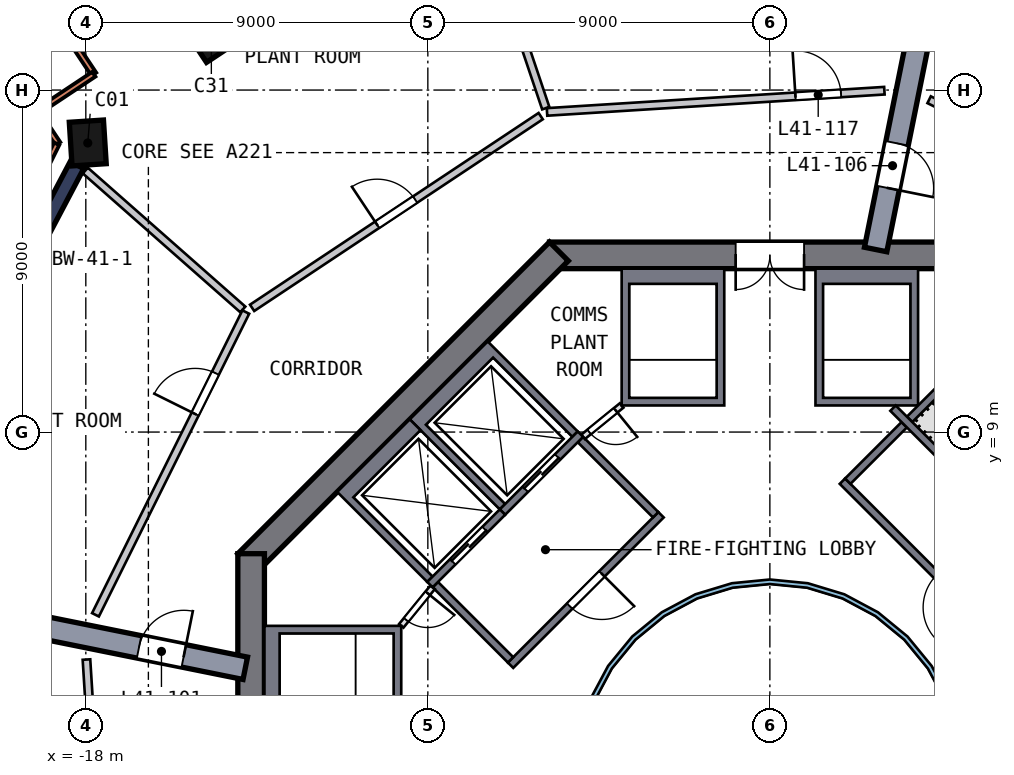
"""IFC4 building model, lengths in metres.
Left out: names, types, materials, properties, quantities, classifications, styles, units other than length and angle.
Written with IfcOpenShell. Run it as: python <this file> out.ifc"""

import sys

from ifc_helpers import new_model, si_unit, direction, frame, frame_2d, origin, origin_2d, place, context, subcontext, project, spatial, polyline, rectangle, outline, extrude, element, fill, save


model = new_model("IFC4")
c1 = context("Model", 3, precision=1e-05, world=origin(), true_north=direction((0.0, 1.0)))
c2 = subcontext(c1, "Body", "Model", "MODEL_VIEW")
j1 = project(units=[si_unit("LENGTHUNIT", "METRE"), si_unit("PLANEANGLEUNIT", "RADIAN")], contexts=[c1])
p1 = place(None, origin())
s1 = spatial("IfcSite", under=j1, at=p1, CompositionType="ELEMENT")
p2 = place(p1, origin())
s2 = spatial("IfcBuilding", under=s1, at=p2, CompositionType="ELEMENT")
p3 = place(p2, frame((0.0, 0.0, 169.0)))
s3 = spatial("IfcBuildingStorey", under=s2, at=p3, CompositionType="ELEMENT", Elevation=169.0)
p4 = place(p3, frame((-17.893, 16.668, 0.0), z_axis=(-0.046008343, -0.050230285, 0.997677378), x_axis=(-0.065051688, 0.99676572, 0.047184497)))
e1 = element("IfcColumn", 1, at=p4, inside=s3, PredefinedType="COLUMN", context=c2, shape_type="SweptSolid", body=[
    extrude(rectangle(XDim=1.15, YDim=0.9, at=origin_2d()), origin(), (0.0, 0.0, 1.0), 4.51),
])
p5 = place(p3, frame((-14.632, 19.403, 0.0), z_axis=(-0.053750027, -0.041192116, 0.997704437), x_axis=(-0.553129571, 0.83308256, 0.004596255)))
e2 = element("IfcColumn", 2, at=p5, inside=s3, PredefinedType="COLUMN", context=c2, shape_type="SweptSolid", body=[
    extrude(rectangle(XDim=0.9, YDim=0.9, at=origin_2d()), origin(), (0.0, 0.0, 1.0), 4.51),
])
p6 = place(p3, frame((5.799, 13.65, 0.0), z_axis=(0.0, 0.0, 1.0), x_axis=(-1.0, 0.0, 0.0)))
e3 = element("IfcWall", 3, at=p6, inside=s3, PredefinedType="SHEAR", context=c2, shape_type="SweptSolid", body=[
    extrude(rectangle(XDim=11.598, YDim=0.7, at=frame_2d((5.799, 0.0))), origin(), (0.0, 0.0, 1.0), 6.0),
])
p7 = place(p6, frame((4.899, 0.0, 0.0)))
e4 = element("IfcOpeningElement", 4, at=p7, cuts=e3, PredefinedType="OPENING", context=c2, shape_type="SweptSolid", body=[
    extrude(rectangle(XDim=1.8, YDim=2.1, at=frame_2d((0.9, 1.05))), frame((0.0, 0.36, 0.0), z_axis=(0.0, -1.0, 0.0), x_axis=(1.0, 0.0, 0.0)), (0.0, 0.0, 1.0), 0.72),
])
p8 = place(p3, frame((-5.552, 13.752, 0.0), z_axis=(0.0, 0.0, 1.0), x_axis=(-0.707106781, -0.707106781, 0.0)))
e5 = element("IfcWall", 5, at=p8, inside=s3, PredefinedType="SHEAR", context=c2, shape_type="SweptSolid", body=[
    extrude(rectangle(XDim=11.598, YDim=0.7, at=frame_2d((5.799, 0.0))), origin(), (0.0, 0.0, 1.0), 6.0),
])
p9 = place(p3, frame((-13.65, 5.799, 0.0), z_axis=(0.0, 0.0, 1.0), x_axis=(0.0, -1.0, 0.0)))
e6 = element("IfcWall", 6, at=p9, inside=s3, PredefinedType="SHEAR", context=c2, shape_type="SweptSolid", body=[
    extrude(rectangle(XDim=11.598, YDim=0.7, at=frame_2d((5.799, 0.0))), origin(), (0.0, 0.0, 1.0), 6.0),
])
p10 = place(p9, frame((4.899, 0.0, 0.0)))
e7 = element("IfcOpeningElement", 7, at=p10, cuts=e6, PredefinedType="OPENING", context=c2, shape_type="SweptSolid", body=[
    extrude(rectangle(XDim=1.8, YDim=2.1, at=frame_2d((0.9, 1.05))), frame((0.0, 0.36, 0.0), z_axis=(0.0, -1.0, 0.0), x_axis=(1.0, 0.0, 0.0)), (0.0, 0.0, 1.0), 0.72),
])
p11 = place(p3, frame((-18.232, 16.026, 0.0), z_axis=(0.0, 0.0, 1.0), x_axis=(-0.466316568, -0.884617917, 0.0)))
e8 = element("IfcWall", 8, at=p11, inside=s3, PredefinedType="SHEAR", context=c2, shape_type="SweptSolid", body=[
    extrude(rectangle(XDim=5.664, YDim=0.4, at=frame_2d((2.832, 0.0))), origin(), (0.0, 0.0, 1.0), 4.5),
])
p12 = place(p3, frame((-13.804, 2.783, 0.0), z_axis=(0.0, 0.0, 1.0), x_axis=(-0.980274297, 0.197641857, 0.0)))
e9 = element("IfcWall", 9, at=p12, inside=s3, PredefinedType="SHEAR", context=c2, shape_type="SweptSolid", body=[
    extrude(rectangle(XDim=9.661, YDim=0.6, at=frame_2d((4.831, 0.0))), origin(), (0.0, 0.0, 1.0), 4.5),
])
p13 = place(p12, frame((1.65, 0.0, 0.0)))
e10 = element("IfcOpeningElement", 10, at=p13, cuts=e9, PredefinedType="OPENING", context=c2, shape_type="SweptSolid", body=[
    extrude(rectangle(XDim=1.2, YDim=2.1, at=frame_2d((0.6, 1.05))), frame((0.0, 0.31, 0.0), z_axis=(0.0, -1.0, 0.0), x_axis=(1.0, 0.0, 0.0)), (0.0, 0.0, 1.0), 0.62),
])
p14 = place(p3, frame((2.783, 13.804, 0.0), z_axis=(0.0, 0.0, 1.0), x_axis=(0.197641857, 0.980274297, 0.0)))
e11 = element("IfcWall", 11, at=p14, inside=s3, PredefinedType="SHEAR", context=c2, shape_type="SweptSolid", body=[
    extrude(rectangle(XDim=9.661, YDim=0.6, at=frame_2d((4.831, 0.0))), origin(), (0.0, 0.0, 1.0), 4.5),
])
p15 = place(p14, frame((1.65, 0.0, 0.0)))
e12 = element("IfcOpeningElement", 12, at=p15, cuts=e11, PredefinedType="OPENING", context=c2, shape_type="SweptSolid", body=[
    extrude(rectangle(XDim=1.2, YDim=2.1, at=frame_2d((0.6, 1.05))), frame((0.0, 0.31, 0.0), z_axis=(0.0, -1.0, 0.0), x_axis=(1.0, 0.0, 0.0)), (0.0, 0.0, 1.0), 0.62),
])
p16 = place(p3, frame((-18.826, 19.978, 0.0), z_axis=(0.0, 0.0, 1.0), x_axis=(0.5533774, -0.832930641, 0.0)))
e13 = element("IfcWall", 13, at=p16, inside=s3, PredefinedType="SOLIDWALL", context=c2, shape_type="SweptSolid", body=[
    extrude(rectangle(XDim=1.875, YDim=0.15, at=frame_2d((0.938, 0.0))), origin(), (0.0, 0.0, 1.0), 4.5),
])
p17 = place(p3, frame((-17.789, 18.416, 0.0), z_axis=(0.0, 0.0, 1.0), x_axis=(-0.832925657, -0.553384902, 0.0)))
e14 = element("IfcWall", 14, at=p17, inside=s3, PredefinedType="SOLIDWALL", context=c2, shape_type="SweptSolid", body=[
    extrude(rectangle(XDim=1.8, YDim=0.15, at=frame_2d((0.9, 0.0))), origin(), (0.0, 0.0, 1.0), 4.5),
])
p18 = place(p3, frame((-19.329, 17.483, 0.0), z_axis=(0.0, 0.0, 1.0), x_axis=(0.553389442, -0.83292264, 0.0)))
e15 = element("IfcWall", 15, at=p18, inside=s3, PredefinedType="SOLIDWALL", context=c2, shape_type="SweptSolid", body=[
    extrude(rectangle(XDim=1.075, YDim=0.15, at=frame_2d((0.538, 0.0))), origin(), (0.0, 0.0, 1.0), 4.5),
])
p19 = place(p3, frame((-18.766, 16.585, 0.0), z_axis=(0.0, 0.0, 1.0), x_axis=(-0.444629289, -0.895714684, 0.0)))
e16 = element("IfcWall", 16, at=p19, inside=s3, PredefinedType="SOLIDWALL", context=c2, shape_type="SweptSolid", body=[
    extrude(rectangle(XDim=13.046, YDim=0.15, at=frame_2d((6.523, 0.0))), origin(), (0.0, 0.0, 1.0), 4.5),
])
p20 = place(p3, origin())
e17 = element("IfcWall", 17, at=p20, inside=s3, PredefinedType="SOLIDWALL", context=c2, shape_type="SweptSolid", body=[
    extrude(outline(polyline([(1.2, 13.3), (3.9, 13.3), (3.9, 9.7), (1.2, 9.7), (1.2, 13.3)]), holes=[polyline([(3.7, 9.9), (3.7, 12.9), (1.4, 12.9), (1.4, 9.9), (3.7, 9.9)])]), origin(), (0.0, 0.0, 1.0), 5.55),
])
p21 = place(p3, origin())
e18 = element("IfcWall", 18, at=p21, inside=s3, PredefinedType="SOLIDWALL", context=c2, shape_type="SweptSolid", body=[
    extrude(outline(polyline([(-3.9, 9.7), (-3.9, 13.3), (-1.2, 13.3), (-1.2, 9.7), (-3.9, 9.7)]), holes=[polyline([(-1.4, 12.9), (-3.7, 12.9), (-3.7, 9.9), (-1.4, 9.9), (-1.4, 12.9)])]), origin(), (0.0, 0.0, 1.0), 5.55),
])
p22 = place(p3, origin())
e19 = element("IfcWall", 19, at=p22, inside=s3, PredefinedType="SOLIDWALL", context=c2, shape_type="SweptSolid", body=[
    extrude(outline(polyline([(-13.3, 1.2), (-13.3, 3.9), (-9.7, 3.9), (-9.7, 1.2), (-13.3, 1.2)]), holes=[polyline([(-9.9, 3.7), (-12.9, 3.7), (-12.9, 1.4), (-9.9, 1.4), (-9.9, 3.7)])]), origin(), (0.0, 0.0, 1.0), 5.55),
])
p23 = place(p3, origin())
e20 = element("IfcWall", 20, at=p23, inside=s3, PredefinedType="SOLIDWALL", context=c2, shape_type="SweptSolid", body=[
    extrude(outline(polyline([(-9.475, 9.334), (-7.425, 11.385), (-5.056, 9.016), (-5.197, 8.874), (-7.283, 10.96), (-9.051, 9.192), (-6.965, 7.106), (-7.106, 6.965), (-9.475, 9.334)])), origin(), (0.0, 0.0, 1.0), 5.55),
])
p24 = place(p3, frame((-4.985, 8.945, 0.0), z_axis=(0.0, 0.0, 1.0), x_axis=(-0.707106781, -0.707106781, 0.0)))
e21 = element("IfcWall", 21, at=p24, inside=s3, PredefinedType="SOLIDWALL", context=c2, shape_type="SweptSolid", body=[
    extrude(rectangle(XDim=2.9, YDim=0.2, at=frame_2d((1.45, 0.0))), origin(), (0.0, 0.0, 1.0), 5.55),
])
p25 = place(p24, frame((0.85, 0.0, 0.0)))
e22 = element("IfcOpeningElement", 22, at=p25, cuts=e21, PredefinedType="OPENING", context=c2, shape_type="SweptSolid", body=[
    extrude(rectangle(XDim=1.2, YDim=2.1, at=frame_2d((0.6, 1.05))), frame((0.0, 0.11, 0.0), z_axis=(0.0, -1.0, 0.0), x_axis=(1.0, 0.0, 0.0)), (0.0, 0.0, 1.0), 0.22),
])
p26 = place(p3, origin())
e23 = element("IfcWall", 23, at=p26, inside=s3, PredefinedType="SOLIDWALL", context=c2, shape_type="SweptSolid", body=[
    extrude(outline(polyline([(-11.385, 7.425), (-9.475, 9.334), (-9.192, 9.051), (-10.96, 7.283), (-8.874, 5.197), (-9.016, 5.056), (-11.385, 7.425)])), origin(), (0.0, 0.0, 1.0), 5.55),
])
p27 = place(p3, frame((-7.036, 6.894, 0.0), z_axis=(0.0, 0.0, 1.0), x_axis=(-0.707106781, -0.707106781, 0.0)))
e24 = element("IfcWall", 24, at=p27, inside=s3, PredefinedType="SOLIDWALL", context=c2, shape_type="SweptSolid", body=[
    extrude(rectangle(XDim=2.7, YDim=0.2, at=frame_2d((1.35, 0.0))), origin(), (0.0, 0.0, 1.0), 5.55),
])
p28 = place(p27, frame((0.65, 0.0, 0.0)))
e25 = element("IfcOpeningElement", 25, at=p28, cuts=e24, PredefinedType="OPENING", context=c2, shape_type="SweptSolid", body=[
    extrude(rectangle(XDim=1.2, YDim=2.1, at=frame_2d((0.6, 1.05))), frame((0.0, 0.11, 0.0), z_axis=(0.0, -1.0, 0.0), x_axis=(1.0, 0.0, 0.0)), (0.0, 0.0, 1.0), 0.22),
])
p29 = place(p3, frame((3.24, 9.629, 0.0), z_axis=(0.0, 0.0, 1.0), x_axis=(0.707106781, -0.707106781, 0.0)))
e26 = element("IfcWall", 26, at=p29, inside=s3, PredefinedType="SOLIDWALL", context=c2, shape_type="SweptSolid", body=[
    extrude(rectangle(XDim=9.036, YDim=0.2, at=frame_2d((4.518, 0.0))), origin(), (0.0, 0.0, 1.0), 5.55),
])
p30 = place(p29, frame((7.018, 0.0, 0.0)))
e27 = element("IfcOpeningElement", 27, at=p30, cuts=e26, PredefinedType="OPENING", context=c2, shape_type="SweptSolid", body=[
    extrude(rectangle(XDim=1.2, YDim=2.1, at=frame_2d((0.6, 1.05))), frame((0.0, 0.11, 0.0), z_axis=(0.0, -1.0, 0.0), x_axis=(1.0, 0.0, 0.0)), (0.0, 0.0, 1.0), 0.22),
])
p31 = place(p3, frame((3.677, 9.334, 0.0), z_axis=(0.0, 0.0, 1.0), x_axis=(0.707106781, 0.707106781, 0.0)))
e28 = element("IfcWall", 28, at=p31, inside=s3, PredefinedType="SOLIDWALL", context=c2, shape_type="SweptSolid", body=[
    extrude(rectangle(XDim=4.1, YDim=0.2, at=frame_2d((2.05, 0.0))), origin(), (0.0, 0.0, 1.0), 5.55),
])
p32 = place(p3, frame((-2.864, 6.823, 0.0), z_axis=(0.0, 0.0, 1.0), x_axis=(-0.707106781, -0.707106781, 0.0)))
e29 = element("IfcWall", 29, at=p32, inside=s3, PredefinedType="SOLIDWALL", context=c2, shape_type="SweptSolid", body=[
    extrude(rectangle(XDim=5.6, YDim=0.2, at=frame_2d((2.8, 0.0))), origin(), (0.0, 0.0, 1.0), 5.55),
])
p33 = place(p32, frame((2.2, 0.0, 0.0)))
e30 = element("IfcOpeningElement", 30, at=p33, cuts=e29, PredefinedType="OPENING", context=c2, shape_type="SweptSolid", body=[
    extrude(rectangle(XDim=1.2, YDim=2.1, at=frame_2d((0.6, 1.05))), frame((0.0, 0.11, 0.0), z_axis=(0.0, -1.0, 0.0), x_axis=(1.0, 0.0, 0.0)), (0.0, 0.0, 1.0), 0.22),
])
for number, where, z_axis, x_axis in (
    (31, (-3.005, 6.823, 0.0), (0.0, 0.0, 1.0), (-0.707, 0.707, 0.0)),
    (32, (-6.823, 3.005, 0.0), (0.0, 0.0, 1.0), (-0.707, 0.707, 0.0)),
):
    element("IfcWall", number, at=place(p3, frame(where, z_axis=z_axis, x_axis=x_axis)), inside=s3, PredefinedType="SOLIDWALL", context=c2, shape_type="SweptSolid", body=[
        extrude(rectangle(XDim=2.8, YDim=0.2, at=frame_2d((1.4, 0.0))), origin(), (0.0, 0.0, 1.0), 5.55),
    ])
p34 = place(p3, frame((-3.9, 9.7, 0.0), z_axis=(0.0, 0.0, 1.0), x_axis=(-0.775559878, -0.631274009, 0.0)))
e33 = element("IfcWall", 33, at=p34, inside=s3, PredefinedType="PARTITIONING", context=c2, shape_type="SweptSolid", body=[
    extrude(rectangle(XDim=1.308, YDim=0.15, at=frame_2d((0.654, 0.0))), origin(), (0.0, 0.0, 1.0), 5.55),
])
p35 = place(p34, frame((0.204, 0.0, 0.0)))
e34 = element("IfcOpeningElement", 34, at=p35, cuts=e33, PredefinedType="OPENING", context=c2, shape_type="SweptSolid", body=[
    extrude(rectangle(XDim=0.9, YDim=2.1, at=frame_2d((0.45, 1.05))), frame((0.0, 0.085, 0.0), z_axis=(0.0, -1.0, 0.0), x_axis=(1.0, 0.0, 0.0)), (0.0, 0.0, 1.0), 0.17),
])
p36 = place(p3, frame((-8.874, 4.914, 0.0), z_axis=(0.0, 0.0, 1.0), x_axis=(-0.631274009, -0.775559878, 0.0)))
e35 = element("IfcWall", 35, at=p36, inside=s3, PredefinedType="PARTITIONING", context=c2, shape_type="SweptSolid", body=[
    extrude(rectangle(XDim=1.308, YDim=0.15, at=frame_2d((0.654, 0.0))), origin(), (0.0, 0.0, 1.0), 5.55),
])
p37 = place(p36, frame((0.204, 0.0, 0.0)))
e36 = element("IfcOpeningElement", 36, at=p37, cuts=e35, PredefinedType="OPENING", context=c2, shape_type="SweptSolid", body=[
    extrude(rectangle(XDim=0.9, YDim=2.1, at=frame_2d((0.45, 1.05))), frame((0.0, 0.085, 0.0), z_axis=(0.0, -1.0, 0.0), x_axis=(1.0, 0.0, 0.0)), (0.0, 0.0, 1.0), 0.17),
])
p38 = place(p3, frame((7.708, 1.909, 0.0), z_axis=(0.0, 0.0, 1.0), x_axis=(-0.707106781, 0.707106781, 0.0)))
e37 = element("IfcWall", 37, at=p38, inside=s3, PredefinedType="SOLIDWALL", context=c2, shape_type="SweptSolid", body=[
    extrude(rectangle(XDim=8.2, YDim=0.2, at=frame_2d((4.1, 0.0))), origin(), (0.0, 0.0, 1.0), 5.55),
])
p39 = place(p38, frame((3.5, 0.0, 0.0)))
e38 = element("IfcOpeningElement", 38, at=p39, cuts=e37, PredefinedType="OPENING", context=c2, shape_type="SweptSolid", body=[
    extrude(rectangle(XDim=1.2, YDim=2.1, at=frame_2d((0.6, 1.05))), frame((0.0, 0.11, 0.0), z_axis=(0.0, -1.0, 0.0), x_axis=(1.0, 0.0, 0.0)), (0.0, 0.0, 1.0), 0.22),
])
p40 = place(p3, frame((2.051, 7.708, 0.0), z_axis=(0.0, 0.0, 1.0), x_axis=(0.707106781, 0.707106781, 0.0)))
e39 = element("IfcWall", 39, at=p40, inside=s3, PredefinedType="SOLIDWALL", context=c2, shape_type="SweptSolid", body=[
    extrude(rectangle(XDim=2.1, YDim=0.2, at=frame_2d((1.05, 0.0))), origin(), (0.0, 0.0, 1.0), 5.55),
])
p41 = place(p3, origin())
e40 = element("IfcWall", 40, at=p41, inside=s3, PredefinedType="SOLIDWALL", context=c2, shape_type="SweptSolid", body=[
    extrude(outline(polyline([(5.021, -0.999), (4.73, -1.959), (4.257, -2.844), (3.62, -3.62), (2.844, -4.257), (1.959, -4.73), (0.999, -5.021), (0.0, -5.12), (-0.999, -5.021), (-1.959, -4.73), (-2.844, -4.257), (-3.62, -3.62), (-4.257, -2.844), (-4.73, -1.959), (-5.021, -0.999), (-5.12, 0.0), (-5.021, 0.999), (-4.73, 1.959), (-4.257, 2.844), (-3.62, 3.62), (-2.844, 4.257), (-1.959, 4.73), (-0.999, 5.021), (0.0, 5.12), (0.999, 5.021), (1.959, 4.73), (2.844, 4.257), (3.62, 3.62), (4.257, 2.844), (4.73, 1.959), (5.021, 0.999), (5.12, 0.0), (5.021, -0.999)]), holes=[polyline([(4.904, 0.976), (4.619, 1.913), (4.157, 2.778), (3.535, 3.535), (2.778, 4.157), (1.913, 4.619), (0.976, 4.904), (0.0, 5.0), (-0.976, 4.904), (-1.913, 4.619), (-2.778, 4.157), (-3.535, 3.535), (-4.157, 2.778), (-4.619, 1.913), (-4.904, 0.976), (-5.0, 0.0), (-4.904, -0.976), (-4.619, -1.913), (-4.157, -2.778), (-3.535, -3.535), (-2.778, -4.157), (-1.913, -4.619), (-0.976, -4.904), (0.0, -5.0), (0.976, -4.904), (1.913, -4.619), (2.778, -4.157), (3.535, -3.535), (4.157, -2.778), (4.619, -1.913), (4.904, -0.976), (5.0, 0.0), (4.904, 0.976)])]), origin(), (0.0, 0.0, 1.0), 5.55),
])
p42 = place(p3, frame((-17.983, 3.013, 0.0), z_axis=(0.0, 0.0, 1.0), x_axis=(0.062764399, -0.998028371, 0.0)))
e41 = element("IfcWall", 41, at=p42, inside=s3, PredefinedType="SOLIDWALL", context=c2, shape_type="SweptSolid", body=[
    extrude(rectangle(XDim=3.937, YDim=0.2, at=frame_2d((1.968, 0.0))), origin(), (0.0, 0.0, 1.0), 4.5),
])
p43 = place(p3, frame((-13.868, 12.227, 0.0), z_axis=(0.0, 0.0, 1.0), x_axis=(-0.750094387, 0.661330788, 0.0)))
e42 = element("IfcWall", 42, at=p43, inside=s3, PredefinedType="SOLIDWALL", context=c2, shape_type="SweptSolid", body=[
    extrude(rectangle(XDim=5.526, YDim=0.2, at=frame_2d((2.763, 0.0))), origin(), (0.0, 0.0, 1.0), 4.5),
])
p44 = place(p3, frame((-17.746, 4.191, 0.0), z_axis=(0.0, 0.0, 1.0), x_axis=(0.444653636, 0.895702598, 0.0)))
e43 = element("IfcWall", 43, at=p44, inside=s3, PredefinedType="SOLIDWALL", context=c2, shape_type="SweptSolid", body=[
    extrude(rectangle(XDim=8.895, YDim=0.2, at=frame_2d((4.447, 0.0))), origin(), (0.0, 0.0, 1.0), 4.5),
])
p45 = place(p44, frame((5.9, 0.0, 0.0)))
e44 = element("IfcOpeningElement", 44, at=p45, cuts=e43, PredefinedType="OPENING", context=c2, shape_type="SweptSolid", body=[
    extrude(rectangle(XDim=1.2, YDim=2.1, at=frame_2d((0.6, 1.05))), frame((0.0, 0.11, 0.0), z_axis=(0.0, -1.0, 0.0), x_axis=(1.0, 0.0, 0.0)), (0.0, 0.0, 1.0), 0.22),
])
p46 = place(p3, frame((-13.624, 12.269, 0.0), z_axis=(0.0, 0.0, 1.0), x_axis=(0.832930915, 0.553376987, 0.0)))
e45 = element("IfcWall", 45, at=p46, inside=s3, PredefinedType="SOLIDWALL", context=c2, shape_type="SweptSolid", body=[
    extrude(rectangle(XDim=9.117, YDim=0.2, at=frame_2d((4.558, 0.0))), origin(), (0.0, 0.0, 1.0), 4.5),
])
p47 = place(p46, frame((3.95, 0.0, 0.0)))
e46 = element("IfcOpeningElement", 46, at=p47, cuts=e45, PredefinedType="OPENING", context=c2, shape_type="SweptSolid", body=[
    extrude(rectangle(XDim=1.2, YDim=2.1, at=frame_2d((0.6, 1.05))), frame((0.0, 0.11, 0.0), z_axis=(0.0, -1.0, 0.0), x_axis=(1.0, 0.0, 0.0)), (0.0, 0.0, 1.0), 0.22),
])
p48 = place(p3, frame((-7.962, 23.66, 0.0), z_axis=(0.0, 0.0, 1.0), x_axis=(0.318952258, -0.947770783, 0.0)))
e47 = element("IfcWall", 47, at=p48, inside=s3, PredefinedType="SOLIDWALL", context=c2, shape_type="SweptSolid", body=[
    extrude(rectangle(XDim=6.476, YDim=0.2, at=frame_2d((3.238, 0.0))), origin(), (0.0, 0.0, 1.0), 4.5),
])
p49 = place(p3, frame((-5.864, 17.425, 0.0), z_axis=(0.0, 0.0, 1.0), x_axis=(0.998027938, 0.062771297, 0.0)))
e48 = element("IfcWall", 48, at=p49, inside=s3, PredefinedType="SOLIDWALL", context=c2, shape_type="SweptSolid", body=[
    extrude(rectangle(XDim=8.895, YDim=0.2, at=frame_2d((4.448, 0.0))), origin(), (0.0, 0.0, 1.0), 4.5),
])
p50 = place(p49, frame((6.55, 0.0, 0.0)))
e49 = element("IfcOpeningElement", 49, at=p50, cuts=e48, PredefinedType="OPENING", context=c2, shape_type="SweptSolid", body=[
    extrude(rectangle(XDim=1.2, YDim=2.1, at=frame_2d((0.6, 1.05))), frame((0.0, 0.11, 0.0), z_axis=(0.0, -1.0, 0.0), x_axis=(1.0, 0.0, 0.0)), (0.0, 0.0, 1.0), 0.22),
])
p51 = place(p3, frame((7.717, 15.995, 0.0), z_axis=(0.0, 0.0, 1.0), x_axis=(-0.895713515, 0.444631643, 0.0)))
e50 = element("IfcWall", 50, at=p51, inside=s3, PredefinedType="SOLIDWALL", context=c2, shape_type="SweptSolid", body=[
    extrude(rectangle(XDim=3.936, YDim=0.2, at=frame_2d((1.968, 0.0))), origin(), (0.0, 0.0, 1.0), 4.5),
])
p52 = place(p25, origin())
e51 = element("IfcDoor", 51, at=p52, inside=s3, OperationType="DOUBLE_DOOR_SLIDING", PredefinedType="DOOR", context=c2, shape_type="SweptSolid", body=[
    extrude(rectangle(XDim=1.2, YDim=2.1, at=frame_2d((0.6, 1.05))), frame((0.0, 0.025, 0.0), z_axis=(0.0, -1.0, 0.0), x_axis=(1.0, 0.0, 0.0)), (0.0, 0.0, 1.0), 0.05),
])
fill(e22, e51)
p53 = place(p28, origin())
e52 = element("IfcDoor", 52, at=p53, inside=s3, OperationType="DOUBLE_DOOR_SLIDING", PredefinedType="DOOR", context=c2, shape_type="SweptSolid", body=[
    extrude(rectangle(XDim=1.2, YDim=2.1, at=frame_2d((0.6, 1.05))), frame((0.0, 0.025, 0.0), z_axis=(0.0, -1.0, 0.0), x_axis=(1.0, 0.0, 0.0)), (0.0, 0.0, 1.0), 0.05),
])
fill(e25, e52)
p54 = place(p7, origin())
e53 = element("IfcDoor", 53, at=p54, inside=s3, OperationType="DOUBLE_DOOR_SINGLE_SWING", PredefinedType="DOOR", context=c2, shape_type="SweptSolid", body=[
    extrude(rectangle(XDim=1.8, YDim=2.1, at=frame_2d((0.9, 1.05))), frame((0.0, 0.025, 0.0), z_axis=(0.0, -1.0, 0.0), x_axis=(1.0, 0.0, 0.0)), (0.0, 0.0, 1.0), 0.05),
])
fill(e4, e53)
p55 = place(p33, origin())
e54 = element("IfcDoor", 54, at=p55, inside=s3, OperationType="SINGLE_SWING_LEFT", PredefinedType="DOOR", context=c2, shape_type="SweptSolid", body=[
    extrude(rectangle(XDim=1.2, YDim=2.1, at=frame_2d((0.6, 1.05))), frame((0.0, 0.025, 0.0), z_axis=(0.0, -1.0, 0.0), x_axis=(1.0, 0.0, 0.0)), (0.0, 0.0, 1.0), 0.05),
])
fill(e30, e54)
p56 = place(p35, origin())
e55 = element("IfcDoor", 55, at=p56, inside=s3, OperationType="SINGLE_SWING_LEFT", PredefinedType="DOOR", context=c2, shape_type="SweptSolid", body=[
    extrude(rectangle(XDim=0.9, YDim=2.1, at=frame_2d((0.45, 1.05))), frame((0.0, 0.025, 0.0), z_axis=(0.0, -1.0, 0.0), x_axis=(1.0, 0.0, 0.0)), (0.0, 0.0, 1.0), 0.05),
])
fill(e34, e55)
p57 = place(p37, origin())
e56 = element("IfcDoor", 56, at=p57, inside=s3, OperationType="SINGLE_SWING_LEFT", PredefinedType="DOOR", context=c2, shape_type="SweptSolid", body=[
    extrude(rectangle(XDim=0.9, YDim=2.1, at=frame_2d((0.45, 1.05))), frame((0.0, 0.025, 0.0), z_axis=(0.0, -1.0, 0.0), x_axis=(1.0, 0.0, 0.0)), (0.0, 0.0, 1.0), 0.05),
])
fill(e36, e56)
p58 = place(p13, origin())
e57 = element("IfcDoor", 57, at=p58, inside=s3, OperationType="SINGLE_SWING_LEFT", PredefinedType="DOOR", context=c2, shape_type="SweptSolid", body=[
    extrude(rectangle(XDim=1.2, YDim=2.1, at=frame_2d((0.6, 1.05))), frame((0.0, 0.025, 0.0), z_axis=(0.0, -1.0, 0.0), x_axis=(1.0, 0.0, 0.0)), (0.0, 0.0, 1.0), 0.05),
])
fill(e10, e57)
p59 = place(p15, origin())
e58 = element("IfcDoor", 58, at=p59, inside=s3, OperationType="SINGLE_SWING_LEFT", PredefinedType="DOOR", context=c2, shape_type="SweptSolid", body=[
    extrude(rectangle(XDim=1.2, YDim=2.1, at=frame_2d((0.6, 1.05))), frame((0.0, 0.025, 0.0), z_axis=(0.0, -1.0, 0.0), x_axis=(1.0, 0.0, 0.0)), (0.0, 0.0, 1.0), 0.05),
])
fill(e12, e58)
p60 = place(p47, origin())
e59 = element("IfcDoor", 59, at=p60, inside=s3, OperationType="SINGLE_SWING_LEFT", PredefinedType="DOOR", context=c2, shape_type="SweptSolid", body=[
    extrude(rectangle(XDim=1.2, YDim=2.1, at=frame_2d((0.6, 1.05))), frame((0.0, 0.025, 0.0), z_axis=(0.0, -1.0, 0.0), x_axis=(1.0, 0.0, 0.0)), (0.0, 0.0, 1.0), 0.05),
])
fill(e46, e59)
p61 = place(p45, origin())
e60 = element("IfcDoor", 60, at=p61, inside=s3, OperationType="SINGLE_SWING_LEFT", PredefinedType="DOOR", context=c2, shape_type="SweptSolid", body=[
    extrude(rectangle(XDim=1.2, YDim=2.1, at=frame_2d((0.6, 1.05))), frame((0.0, 0.025, 0.0), z_axis=(0.0, -1.0, 0.0), x_axis=(1.0, 0.0, 0.0)), (0.0, 0.0, 1.0), 0.05),
])
fill(e44, e60)
p62 = place(p50, origin())
e61 = element("IfcDoor", 61, at=p62, inside=s3, OperationType="SINGLE_SWING_LEFT", PredefinedType="DOOR", context=c2, shape_type="SweptSolid", body=[
    extrude(rectangle(XDim=1.2, YDim=2.1, at=frame_2d((0.6, 1.05))), frame((0.0, 0.025, 0.0), z_axis=(0.0, -1.0, 0.0), x_axis=(1.0, 0.0, 0.0)), (0.0, 0.0, 1.0), 0.05),
])
fill(e49, e61)
save(model, sys.argv[1])
